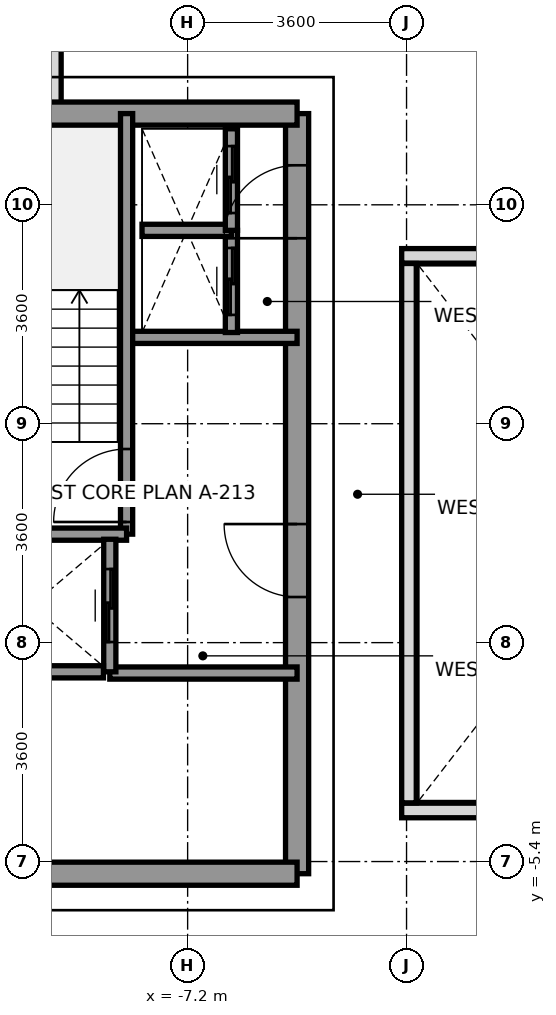
"""IFC4 building model, lengths in metres.
Left out: names, types, materials, properties, quantities, classifications, styles, units other than length and angle.
Written with IfcOpenShell. Run it as: python <this file> out.ifc"""

import sys

from ifc_helpers import new_model, si_unit, direction, frame, frame_2d, origin, place, context, subcontext, project, spatial, rectangle, extrude, source, transform, mapped, element, fill, save


model = new_model("IFC4")
c1 = context("Model", 3, precision=1e-05, world=origin(), true_north=direction((0.0, 1.0)))
c2 = subcontext(c1, "Body", "Model", "MODEL_VIEW")
j1 = project(units=[si_unit("LENGTHUNIT", "METRE"), si_unit("PLANEANGLEUNIT", "RADIAN")], contexts=[c1])
p1 = place(None, origin())
s1 = spatial("IfcSite", under=j1, at=p1, CompositionType="ELEMENT")
p2 = place(p1, origin())
s2 = spatial("IfcBuilding", under=s1, at=p2, CompositionType="ELEMENT")
p3 = place(p2, frame((0.0, 0.0, 194.4)))
s3 = spatial("IfcBuildingStorey", under=s2, at=p3, CompositionType="ELEMENT", Elevation=194.4)
p4 = place(p3, frame((-9.4, 6.953, 0.0), z_axis=(0.0, 0.0, 1.0), x_axis=(0.0, 1.0, 0.0)))
e1 = element("IfcWall", 1, at=p4, inside=s3, PredefinedType="PARAPET", context=c2, shape_type="SweptSolid", body=[
    extrude(rectangle(XDim=1.594, YDim=0.24, at=frame_2d((0.797, 0.0))), origin(), (0.0, 0.0, 1.0), 1.15),
])
p5 = place(p3, frame((-5.4, -5.6, 0.0), z_axis=(0.0, 0.0, 1.0), x_axis=(0.0, 1.0, 0.0)))
e2 = element("IfcWall", 2, at=p5, inside=s3, PredefinedType="SHEAR", context=c2, shape_type="SweptSolid", body=[
    extrude(rectangle(XDim=12.5, YDim=0.38, at=frame_2d((6.25, 0.0))), origin(), (0.0, 0.0, 1.0), 3.2),
])
p6 = place(p5, frame((4.55, 0.0, 0.0)))
e3 = element("IfcOpeningElement", 3, at=p6, cuts=e2, PredefinedType="OPENING", context=c2, shape_type="SweptSolid", body=[
    extrude(rectangle(XDim=1.2, YDim=2.2, at=frame_2d((0.6, 1.1))), frame((0.0, 0.2, 0.0), z_axis=(0.0, -1.0, 0.0), x_axis=(1.0, 0.0, 0.0)), (0.0, 0.0, 1.0), 0.4),
])
p7 = place(p5, frame((10.45, 0.0, 0.0)))
e4 = element("IfcOpeningElement", 4, at=p7, cuts=e2, PredefinedType="OPENING", context=c2, shape_type="SweptSolid", body=[
    extrude(rectangle(XDim=1.2, YDim=2.2, at=frame_2d((0.6, 1.1))), frame((0.0, 0.2, 0.0), z_axis=(0.0, -1.0, 0.0), x_axis=(1.0, 0.0, 0.0)), (0.0, 0.0, 1.0), 0.4),
])
p8 = place(p3, frame((-11.356, 6.9, 0.0), z_axis=(0.0, 0.0, 1.0), x_axis=(1.0, 0.0, 0.0)))
e5 = element("IfcWall", 5, at=p8, inside=s3, PredefinedType="SHEAR", context=c2, shape_type="SweptSolid", body=[
    extrude(rectangle(XDim=5.956, YDim=0.38, at=frame_2d((2.978, 0.0))), origin(), (0.0, 0.0, 1.0), 3.2),
])
p9 = place(p3, frame((-13.2, -5.6, 0.0), z_axis=(0.0, 0.0, 1.0), x_axis=(1.0, 0.0, 0.0)))
e6 = element("IfcWall", 6, at=p9, inside=s3, PredefinedType="SHEAR", context=c2, shape_type="SweptSolid", body=[
    extrude(rectangle(XDim=7.8, YDim=0.38, at=frame_2d((3.9, 0.0))), origin(), (0.0, 0.0, 1.0), 3.2),
])
p10 = place(p3, frame((-8.18, 3.22, 0.0), z_axis=(0.0, 0.0, 1.0), x_axis=(1.0, 0.0, 0.0)))
e7 = element("IfcWall", 7, at=p10, inside=s3, PredefinedType="SOLIDWALL", context=c2, shape_type="SweptSolid", body=[
    extrude(rectangle(XDim=2.78, YDim=0.2, at=frame_2d((1.39, 0.0))), origin(), (0.0, 0.0, 1.0), 3.2),
])
p11 = place(p3, frame((-8.48, -2.3, 0.0), z_axis=(0.0, 0.0, 1.0), x_axis=(1.0, 0.0, 0.0)))
e8 = element("IfcWall", 8, at=p11, inside=s3, PredefinedType="SOLIDWALL", context=c2, shape_type="SweptSolid", body=[
    extrude(rectangle(XDim=3.08, YDim=0.2, at=frame_2d((1.54, 0.0))), origin(), (0.0, 0.0, 1.0), 3.2),
])
p12 = place(p3, frame((-8.204, -0.016, 0.0), z_axis=(0.0, 0.0, 1.0), x_axis=(0.0, 1.0, 0.0)))
e9 = element("IfcWall", 9, at=p12, inside=s3, PredefinedType="SOLIDWALL", context=c2, shape_type="SweptSolid", body=[
    extrude(rectangle(XDim=6.916, YDim=0.2, at=frame_2d((3.458, 0.0))), origin(), (0.0, 0.0, 1.0), 3.2),
])
p13 = place(p12, frame((0.2, 0.0, 0.0)))
e10 = element("IfcOpeningElement", 10, at=p13, cuts=e9, PredefinedType="OPENING", context=c2, shape_type="SweptSolid", body=[
    extrude(rectangle(XDim=1.2, YDim=2.2, at=frame_2d((0.6, 1.1))), frame((0.0, 0.11, 0.0), z_axis=(0.0, -1.0, 0.0), x_axis=(1.0, 0.0, 0.0)), (0.0, 0.0, 1.0), 0.22),
])
p14 = place(p3, frame((-11.356, -0.016, 0.0), z_axis=(0.0, 0.0, 1.0), x_axis=(1.0, 0.0, 0.0)))
e11 = element("IfcWall", 11, at=p14, inside=s3, PredefinedType="SOLIDWALL", context=c2, shape_type="SweptSolid", body=[
    extrude(rectangle(XDim=3.152, YDim=0.2, at=frame_2d((1.576, 0.0))), origin(), (0.0, 0.0, 1.0), 3.2),
])
p15 = place(p3, frame((-8.48, -2.28, 0.0), z_axis=(0.0, 0.0, 1.0), x_axis=(0.0, 1.0, 0.0)))
e12 = element("IfcWall", 12, at=p15, inside=s3, PredefinedType="SOLIDWALL", context=c2, shape_type="SweptSolid", body=[
    extrude(rectangle(XDim=2.18, YDim=0.2, at=frame_2d((1.09, 0.0))), origin(), (0.0, 0.0, 1.0), 3.2),
])
p16 = place(p15, frame((0.49, 0.0, 0.0)))
e13 = element("IfcOpeningElement", 13, at=p16, cuts=e12, PredefinedType="OPENING", context=c2, shape_type="SweptSolid", body=[
    extrude(rectangle(XDim=1.2, YDim=2.2, at=frame_2d((0.6, 1.1))), frame((0.0, 0.11, 0.0), z_axis=(0.0, -1.0, 0.0), x_axis=(1.0, 0.0, 0.0)), (0.0, 0.0, 1.0), 0.22),
])
p17 = place(p3, frame((-10.946, -2.28, 0.0), z_axis=(0.0, 0.0, 1.0), x_axis=(1.0, 0.0, 0.0)))
e14 = element("IfcWall", 14, at=p17, inside=s3, PredefinedType="SOLIDWALL", context=c2, shape_type="SweptSolid", body=[
    extrude(rectangle(XDim=2.362, YDim=0.2, at=frame_2d((1.181, 0.0))), origin(), (0.0, 0.0, 1.0), 3.2),
])
p18 = place(p3, frame((-6.48, 3.3, 0.0), z_axis=(0.0, 0.0, 1.0), x_axis=(0.0, 1.0, 0.0)))
e15 = element("IfcWall", 15, at=p18, inside=s3, PredefinedType="SOLIDWALL", context=c2, shape_type="SweptSolid", body=[
    extrude(rectangle(XDim=1.68, YDim=0.2, at=frame_2d((0.84, 0.0))), origin(), (0.0, 0.0, 1.0), 3.2),
])
p19 = place(p18, frame((0.29, 0.0, 0.0)))
e16 = element("IfcOpeningElement", 16, at=p19, cuts=e15, PredefinedType="OPENING", context=c2, shape_type="SweptSolid", body=[
    extrude(rectangle(XDim=1.1, YDim=2.2, at=frame_2d((0.55, 1.1))), frame((0.0, 0.11, 0.0), z_axis=(0.0, -1.0, 0.0), x_axis=(1.0, 0.0, 0.0)), (0.0, 0.0, 1.0), 0.22),
])
p20 = place(p3, frame((-7.95, 4.98, 0.0), z_axis=(0.0, 0.0, 1.0), x_axis=(1.0, 0.0, 0.0)))
e17 = element("IfcWall", 17, at=p20, inside=s3, PredefinedType="SOLIDWALL", context=c2, shape_type="SweptSolid", body=[
    extrude(rectangle(XDim=1.47, YDim=0.2, at=frame_2d((0.735, 0.0))), origin(), (0.0, 0.0, 1.0), 3.2),
])
p21 = place(p3, frame((-6.48, 4.98, 0.0), z_axis=(0.0, 0.0, 1.0), x_axis=(0.0, 1.0, 0.0)))
e18 = element("IfcWall", 18, at=p21, inside=s3, PredefinedType="SOLIDWALL", context=c2, shape_type="SweptSolid", body=[
    extrude(rectangle(XDim=1.67, YDim=0.2, at=frame_2d((0.835, 0.0))), origin(), (0.0, 0.0, 1.0), 3.2),
])
p22 = place(p21, frame((0.285, 0.0, 0.0)))
e19 = element("IfcOpeningElement", 19, at=p22, cuts=e18, PredefinedType="OPENING", context=c2, shape_type="SweptSolid", body=[
    extrude(rectangle(XDim=1.1, YDim=2.2, at=frame_2d((0.55, 1.1))), frame((0.0, 0.11, 0.0), z_axis=(0.0, -1.0, 0.0), x_axis=(1.0, 0.0, 0.0)), (0.0, 0.0, 1.0), 0.22),
])
for number, where, z_axis, x_axis in (
    (20, (-3.68, -4.56, 0.0), (0.0, 0.0, 1.0), (1.0, 0.0, 0.0)),
    (21, (-3.68, 4.56, 0.0), (0.0, 0.0, 1.0), (1.0, 0.0, 0.0)),
):
    element("IfcWall", number, at=place(p3, frame(where, z_axis=z_axis, x_axis=x_axis)), inside=s3, PredefinedType="PARAPET", context=c2, shape_type="SweptSolid", body=[
        extrude(rectangle(XDim=7.36, YDim=0.24, at=frame_2d((3.68, 0.0))), origin(), (0.0, 0.0, 1.0), 1.15),
    ])
p23 = place(p3, frame((-3.56, -4.435, 0.0), z_axis=(0.0, 0.0, 1.0), x_axis=(0.0, 1.0, 0.0)))
e22 = element("IfcWall", 22, at=p23, inside=s3, PredefinedType="PARAPET", context=c2, shape_type="SweptSolid", body=[
    extrude(rectangle(XDim=8.87, YDim=0.24, at=frame_2d((4.435, 0.0))), origin(), (0.0, 0.0, 1.0), 1.15),
])
m1 = source(origin(), c2, "Body", "SweptSolid", [
    extrude(rectangle(XDim=1.2, YDim=2.2, at=frame_2d((0.6, 1.1))), frame((0.0, 0.025, 0.0), z_axis=(0.0, -1.0, 0.0), x_axis=(1.0, 0.0, 0.0)), (0.0, 0.0, 1.0), 0.05),
])
p24 = place(p13, origin())
e23 = element("IfcDoor", 23, at=p24, inside=s3, OperationType="SINGLE_SWING_LEFT", PredefinedType="DOOR", context=c2, shape_type="MappedRepresentation", body=[
    mapped(m1, transform((0.0, 0.0, 0.0), x_axis=(1.0, 0.0, 0.0), y_axis=(0.0, 1.0, 0.0), z_axis=(0.0, 0.0, 1.0), scale=1.0)),
])
fill(e10, e23)
p25 = place(p6, origin())
e24 = element("IfcDoor", 24, at=p25, inside=s3, OperationType="SINGLE_SWING_RIGHT", PredefinedType="DOOR", context=c2, shape_type="MappedRepresentation", body=[
    mapped(m1, transform((0.0, 0.0, 0.0), x_axis=(1.0, 0.0, 0.0), y_axis=(0.0, 1.0, 0.0), z_axis=(0.0, 0.0, 1.0), scale=1.0)),
])
fill(e3, e24)
p26 = place(p7, origin())
e25 = element("IfcDoor", 25, at=p26, inside=s3, OperationType="SINGLE_SWING_LEFT", PredefinedType="DOOR", context=c2, shape_type="MappedRepresentation", body=[
    mapped(m1, transform((0.0, 0.0, 0.0), x_axis=(1.0, 0.0, 0.0), y_axis=(0.0, 1.0, 0.0), z_axis=(0.0, 0.0, 1.0), scale=1.0)),
])
fill(e4, e25)
p27 = place(p16, origin())
e26 = element("IfcDoor", 26, at=p27, inside=s3, OperationType="SLIDING_TO_RIGHT", PredefinedType="DOOR", context=c2, shape_type="MappedRepresentation", body=[
    mapped(m1, transform((0.0, 0.0, 0.0), x_axis=(1.0, 0.0, 0.0), y_axis=(0.0, 1.0, 0.0), z_axis=(0.0, 0.0, 1.0), scale=1.0)),
])
fill(e13, e26)
m2 = source(origin(), c2, "Body", "SweptSolid", [
    extrude(rectangle(XDim=1.1, YDim=2.2, at=frame_2d((0.55, 1.1))), frame((0.0, 0.025, 0.0), z_axis=(0.0, -1.0, 0.0), x_axis=(1.0, 0.0, 0.0)), (0.0, 0.0, 1.0), 0.05),
])
p28 = place(p19, origin())
e27 = element("IfcDoor", 27, at=p28, inside=s3, OperationType="SLIDING_TO_LEFT", PredefinedType="DOOR", context=c2, shape_type="MappedRepresentation", body=[
    mapped(m2, transform((0.0, 0.0, 0.0), x_axis=(1.0, 0.0, 0.0), y_axis=(0.0, 1.0, 0.0), z_axis=(0.0, 0.0, 1.0), scale=1.0)),
])
fill(e16, e27)
p29 = place(p22, origin())
e28 = element("IfcDoor", 28, at=p29, inside=s3, OperationType="SLIDING_TO_LEFT", PredefinedType="DOOR", context=c2, shape_type="MappedRepresentation", body=[
    mapped(m2, transform((0.0, 0.0, 0.0), x_axis=(1.0, 0.0, 0.0), y_axis=(0.0, 1.0, 0.0), z_axis=(0.0, 0.0, 1.0), scale=1.0)),
])
fill(e19, e28)
save(model, sys.argv[1])
